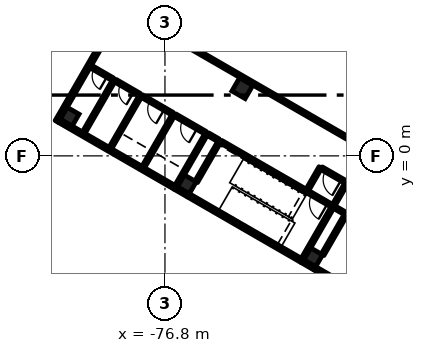
"""IFC4 building model, lengths in metres.
Left out: names, types, materials, properties, quantities, classifications, styles, units other than length and angle.
Written with IfcOpenShell. Run it as: python <this file> out.ifc"""

import sys

from ifc_helpers import new_model, si_unit, direction, frame, frame_2d, origin, origin_2d, place, context, subcontext, project, spatial, rectangle, extrude, element, fill, save


model = new_model("IFC4")
c1 = context("Model", 3, precision=1e-05, world=origin(), true_north=direction((0.0, 1.0)))
c2 = subcontext(c1, "Body", "Model", "MODEL_VIEW")
j1 = project(units=[si_unit("LENGTHUNIT", "METRE"), si_unit("PLANEANGLEUNIT", "RADIAN")], contexts=[c1])
p1 = place(None, origin())
s1 = spatial("IfcSite", under=j1, at=p1, CompositionType="ELEMENT")
p2 = place(p1, origin())
s2 = spatial("IfcBuilding", under=s1, at=p2, CompositionType="ELEMENT")
p3 = place(p2, frame((0.0, 0.0, 6.0)))
s3 = spatial("IfcBuildingStorey", under=s2, at=p3, CompositionType="ELEMENT", Elevation=6.0)
p4 = place(p3, frame((-71.71, 4.451, 0.0), z_axis=(0.0, 0.0, 1.0), x_axis=(-0.5, -0.866025403784, 0.0)))
e1 = element("IfcColumn", 1, at=p4, inside=s3, PredefinedType="COLUMN", context=c2, shape_type="SweptSolid", body=[
    extrude(rectangle(XDim=1.0, YDim=1.0, at=origin_2d()), origin(), (0.0, 0.0, 1.0), 5.4),
])
for number, where, z_axis, x_axis in (
    (2, (-67.046, -6.671, 0.0), (0.0, 0.0, 1.0), (-0.5, -0.866, 0.0)),
    (3, (-75.36, -1.871, 0.0), (0.0, 0.0, 1.0), (-0.5, -0.866, 0.0)),
    (4, (-83.067, 2.579, 0.0), (0.0, 0.0, 1.0), (-0.5, -0.866, 0.0)),
):
    element("IfcColumn", number, at=place(p3, frame(where, z_axis=z_axis, x_axis=x_axis)), inside=s3, PredefinedType="COLUMN", context=c2, shape_type="SweptSolid", body=[
        extrude(rectangle(XDim=0.9, YDim=0.9, at=origin_2d()), origin(), (0.0, 0.0, 1.0), 5.4),
    ])
p5 = place(p3, frame((-83.915, 2.26, 0.0), z_axis=(0.0, 0.0, 1.0), x_axis=(0.500001855621, 0.866024332438, 0.0)))
e5 = element("IfcWall", 5, at=p5, inside=s3, PredefinedType="SOLIDWALL", context=c2, shape_type="SweptSolid", body=[
    extrude(rectangle(XDim=10.312, YDim=0.25, at=frame_2d((5.156, 0.0))), origin(), (0.0, 0.0, 1.0), 5.1),
])
p6 = place(p3, frame((-59.496, -11.694, 0.0), z_axis=(0.0, 0.0, 1.0), x_axis=(-0.866021068297, 0.500007509209, 0.0)))
e6 = element("IfcWall", 6, at=p6, inside=s3, PredefinedType="SOLIDWALL", context=c2, shape_type="SweptSolid", body=[
    extrude(rectangle(XDim=8.6, YDim=0.25, at=frame_2d((4.3, 0.0))), origin(), (0.0, 0.0, 1.0), 5.1),
])
p7 = place(p3, frame((-67.81, -6.894, 0.0), z_axis=(0.0, 0.0, 1.0), x_axis=(-0.866028165386, 0.499995216735, 0.0)))
e7 = element("IfcWall", 7, at=p7, inside=s3, PredefinedType="SOLIDWALL", context=c2, shape_type="SweptSolid", body=[
    extrude(rectangle(XDim=8.6, YDim=0.25, at=frame_2d((4.3, 0.0))), origin(), (0.0, 0.0, 1.0), 5.1),
])
p8 = place(p3, frame((-76.124, -2.094, 0.0), z_axis=(0.0, 0.0, 1.0), x_axis=(-0.866025267465, 0.500000236112, 0.0)))
e8 = element("IfcWall", 8, at=p8, inside=s3, PredefinedType="SOLIDWALL", context=c2, shape_type="SweptSolid", body=[
    extrude(rectangle(XDim=8.8, YDim=0.25, at=frame_2d((4.4, 0.0))), origin(), (0.0, 0.0, 1.0), 5.1),
])
for number, where, z_axis, x_axis in (
    (9, (-66.944, -7.394, 0.0), (0.0, 0.0, 1.0), (-0.866, 0.5, 0.0)),
    (10, (-75.258, -2.594, 0.0), (0.0, 0.0, 1.0), (-0.866, 0.5, 0.0)),
):
    element("IfcWall", number, at=place(p3, frame(where, z_axis=z_axis, x_axis=x_axis)), inside=s3, PredefinedType="SOLIDWALL", context=c2, shape_type="SweptSolid", body=[
        extrude(rectangle(XDim=1.0, YDim=0.25, at=frame_2d((0.5, 0.0))), origin(), (0.0, 0.0, 1.0), 5.1),
    ])
p9 = place(p3, frame((-64.881, -3.821, 0.0), z_axis=(0.0, 0.0, 1.0), x_axis=(-0.49999285859, -0.86602952684, 0.0)))
e11 = element("IfcWall", 11, at=p9, inside=s3, PredefinedType="SOLIDWALL", context=c2, shape_type="SweptSolid", body=[
    extrude(rectangle(XDim=3.1, YDim=0.2, at=frame_2d((1.55, 0.0))), origin(), (0.0, 0.0, 1.0), 5.1),
])
p10 = place(p3, frame((-65.747, -3.321, 0.0), z_axis=(0.0, 0.0, 1.0), x_axis=(-0.49999894854, -0.866026010844, 0.0)))
e12 = element("IfcWall", 12, at=p10, inside=s3, PredefinedType="SOLIDWALL", context=c2, shape_type="SweptSolid", body=[
    extrude(rectangle(XDim=4.0, YDim=0.2, at=frame_2d((2.0, 0.0))), origin(), (0.0, 0.0, 1.0), 5.1),
])
p11 = place(p3, frame((-73.195, 0.979, 0.0), z_axis=(0.0, 0.0, 1.0), x_axis=(-0.500026960575, -0.86600983753, 0.0)))
e13 = element("IfcWall", 13, at=p11, inside=s3, PredefinedType="SOLIDWALL", context=c2, shape_type="SweptSolid", body=[
    extrude(rectangle(XDim=3.1, YDim=0.2, at=frame_2d((1.55, 0.0))), origin(), (0.0, 0.0, 1.0), 5.1),
])
p12 = place(p3, frame((-65.834, -3.271, 0.0), z_axis=(0.0, 0.0, 1.0), x_axis=(-0.866036909293, 0.499980071345, 0.0)))
e14 = element("IfcWall", 14, at=p12, inside=s3, PredefinedType="SOLIDWALL", context=c2, shape_type="SweptSolid", body=[
    extrude(rectangle(XDim=1.75, YDim=0.2, at=frame_2d((0.875, 0.0))), origin(), (0.0, 0.0, 1.0), 5.1),
])
p13 = place(p12, frame((0.3, 0.0, 0.0)))
e15 = element("IfcOpeningElement", 15, at=p13, cuts=e14, PredefinedType="OPENING", context=c2, shape_type="SweptSolid", body=[
    extrude(rectangle(XDim=1.2, YDim=2.1, at=frame_2d((0.6, 1.05))), frame((0.0, 0.11, 0.0), z_axis=(0.0, -1.0, 0.0), x_axis=(1.0, 0.0, 0.0)), (0.0, 0.0, 1.0), 0.22),
])
p14 = place(p3, frame((-67.349, -2.396, 0.0), z_axis=(0.0, 0.0, 1.0), x_axis=(-0.86601134256, 0.500024353964, 0.0)))
e16 = element("IfcWall", 16, at=p14, inside=s3, PredefinedType="SOLIDWALL", context=c2, shape_type="SweptSolid", body=[
    extrude(rectangle(XDim=6.65, YDim=0.2, at=frame_2d((3.325, 0.0))), origin(), (0.0, 0.0, 1.0), 5.1),
])
for number, where, z_axis, x_axis in (
    (17, (-74.061, 1.479, 0.0), (0.0, 0.0, 1.0), (-0.5, -0.866, 0.0)),
    (18, (-76.226, 2.729, 0.0), (0.0, 0.0, 1.0), (-0.5, -0.866, 0.0)),
    (19, (-78.391, 3.979, 0.0), (0.0, 0.0, 1.0), (-0.5, -0.866, 0.0)),
):
    element("IfcWall", number, at=place(p3, frame(where, z_axis=z_axis, x_axis=x_axis)), inside=s3, PredefinedType="SOLIDWALL", context=c2, shape_type="SweptSolid", body=[
        extrude(rectangle(XDim=4.0, YDim=0.2, at=frame_2d((2.0, 0.0))), origin(), (0.0, 0.0, 1.0), 5.1),
    ])
p15 = place(p3, frame((-74.148, 1.529, 0.0), z_axis=(0.0, 0.0, 1.0), x_axis=(-0.865980515519, 0.500077740698, 0.0)))
e20 = element("IfcWall", 20, at=p15, inside=s3, PredefinedType="SOLIDWALL", context=c2, shape_type="SweptSolid", body=[
    extrude(rectangle(XDim=2.3, YDim=0.2, at=frame_2d((1.15, 0.0))), origin(), (0.0, 0.0, 1.0), 5.1),
])
p16 = place(p15, frame((0.6, 0.0, 0.0)))
e21 = element("IfcOpeningElement", 21, at=p16, cuts=e20, PredefinedType="OPENING", context=c2, shape_type="SweptSolid", body=[
    extrude(rectangle(XDim=1.1, YDim=2.1, at=frame_2d((0.55, 1.05))), frame((0.0, 0.11, 0.0), z_axis=(0.0, -1.0, 0.0), x_axis=(1.0, 0.0, 0.0)), (0.0, 0.0, 1.0), 0.22),
])
p17 = place(p3, frame((-76.313, 2.779, 0.0), z_axis=(0.0, 0.0, 1.0), x_axis=(-0.865980515519, 0.500077740698, 0.0)))
e22 = element("IfcWall", 22, at=p17, inside=s3, PredefinedType="SOLIDWALL", context=c2, shape_type="SweptSolid", body=[
    extrude(rectangle(XDim=2.3, YDim=0.2, at=frame_2d((1.15, 0.0))), origin(), (0.0, 0.0, 1.0), 5.1),
])
p18 = place(p17, frame((0.6, 0.0, 0.0)))
e23 = element("IfcOpeningElement", 23, at=p18, cuts=e22, PredefinedType="OPENING", context=c2, shape_type="SweptSolid", body=[
    extrude(rectangle(XDim=1.1, YDim=2.1, at=frame_2d((0.55, 1.05))), frame((0.0, 0.11, 0.0), z_axis=(0.0, -1.0, 0.0), x_axis=(1.0, 0.0, 0.0)), (0.0, 0.0, 1.0), 0.22),
])
for number, where, z_axis, x_axis in (
    (24, (-64.847, -1.763, 0.0), (0.0, 0.0, 1.0), (-0.5, -0.866, 0.0)),
    (25, (-66.579, -0.763, 0.0), (0.0, 0.0, 1.0), (-0.5, -0.866, 0.0)),
):
    element("IfcWall", number, at=place(p3, frame(where, z_axis=z_axis, x_axis=x_axis)), inside=s3, PredefinedType="PARTITIONING", context=c2, shape_type="SweptSolid", body=[
        extrude(rectangle(XDim=1.7, YDim=0.2, at=frame_2d((0.85, 0.0))), origin(), (0.0, 0.0, 1.0), 4.5),
    ])
p19 = place(p3, frame((-64.934, -1.713, 0.0), z_axis=(0.0, 0.0, 1.0), x_axis=(-0.866022985545, 0.500004188491, 0.0)))
e26 = element("IfcWall", 26, at=p19, inside=s3, PredefinedType="PARTITIONING", context=c2, shape_type="SweptSolid", body=[
    extrude(rectangle(XDim=1.8, YDim=0.2, at=frame_2d((0.9, 0.0))), origin(), (0.0, 0.0, 1.0), 4.5),
])
p20 = place(p19, frame((0.3, 0.0, 0.0)))
e27 = element("IfcOpeningElement", 27, at=p20, cuts=e26, PredefinedType="OPENING", context=c2, shape_type="SweptSolid", body=[
    extrude(rectangle(XDim=1.2, YDim=2.1, at=frame_2d((0.6, 1.05))), frame((0.0, 0.11, 0.0), z_axis=(0.0, -1.0, 0.0), x_axis=(1.0, 0.0, 0.0)), (0.0, 0.0, 1.0), 0.22),
])
p21 = place(p3, frame((-80.145, 4.991, 0.0), z_axis=(0.0, 0.0, 1.0), x_axis=(-0.49999894854, -0.866026010844, 0.0)))
e28 = element("IfcWall", 28, at=p21, inside=s3, PredefinedType="PARTITIONING", context=c2, shape_type="SweptSolid", body=[
    extrude(rectangle(XDim=4.0, YDim=0.2, at=frame_2d((2.0, 0.0))), origin(), (0.0, 0.0, 1.0), 4.5),
])
p22 = place(p3, frame((-78.478, 4.029, 0.0), z_axis=(0.0, 0.0, 1.0), x_axis=(-0.865978377894, 0.500081442387, 0.0)))
e29 = element("IfcWall", 29, at=p22, inside=s3, PredefinedType="PARTITIONING", context=c2, shape_type="SweptSolid", body=[
    extrude(rectangle(XDim=1.825, YDim=0.2, at=frame_2d((0.913, 0.0))), origin(), (0.0, 0.0, 1.0), 4.5),
])
p23 = place(p22, frame((0.413, 0.0, 0.0)))
e30 = element("IfcOpeningElement", 30, at=p23, cuts=e29, PredefinedType="OPENING", context=c2, shape_type="SweptSolid", body=[
    extrude(rectangle(XDim=1.0, YDim=2.1, at=frame_2d((0.5, 1.05))), frame((0.0, 0.11, 0.0), z_axis=(0.0, -1.0, 0.0), x_axis=(1.0, 0.0, 0.0)), (0.0, 0.0, 1.0), 0.22),
])
p24 = place(p3, frame((-80.231, 5.041, 0.0), z_axis=(0.0, 0.0, 1.0), x_axis=(-0.865964676353, 0.500105168249, 0.0)))
e31 = element("IfcWall", 31, at=p24, inside=s3, PredefinedType="PARTITIONING", context=c2, shape_type="SweptSolid", body=[
    extrude(rectangle(XDim=1.675, YDim=0.2, at=frame_2d((0.837, 0.0))), origin(), (0.0, 0.0, 1.0), 4.5),
])
p25 = place(p24, frame((0.413, 0.0, 0.0)))
e32 = element("IfcOpeningElement", 32, at=p25, cuts=e31, PredefinedType="OPENING", context=c2, shape_type="SweptSolid", body=[
    extrude(rectangle(XDim=1.0, YDim=2.1, at=frame_2d((0.5, 1.05))), frame((0.0, 0.11, 0.0), z_axis=(0.0, -1.0, 0.0), x_axis=(1.0, 0.0, 0.0)), (0.0, 0.0, 1.0), 0.22),
])
p26 = place(p3, frame((-41.866, -12.058, 0.0), z_axis=(0.0, 0.0, 1.0), x_axis=(-0.866025540551, 0.499999763114, 0.0)))
e33 = element("IfcWall", 33, at=p26, inside=s3, PredefinedType="PARTITIONING", context=c2, shape_type="SweptSolid", body=[
    extrude(rectangle(XDim=39.4, YDim=0.2, at=frame_2d((19.7, 0.0))), origin(), (0.0, 0.0, 1.0), 4.5),
])
p27 = place(p3, frame((-64.968, -3.771, 0.0), z_axis=(0.0, 0.0, 1.0), x_axis=(-0.865885638426, 0.500242002602, 0.0)))
e34 = element("IfcWall", 34, at=p27, inside=s3, PredefinedType="PARTITIONING", context=c2, shape_type="SweptSolid", body=[
    extrude(rectangle(XDim=0.8, YDim=0.2, at=frame_2d((0.4, 0.0))), origin(), (0.0, 0.0, 1.0), 4.5),
])
p28 = place(p3, frame((-73.281, 1.029, 0.0), z_axis=(0.0, 0.0, 1.0), x_axis=(-0.865961984968, 0.500109828528, 0.0)))
e35 = element("IfcWall", 35, at=p28, inside=s3, PredefinedType="PARTITIONING", context=c2, shape_type="SweptSolid", body=[
    extrude(rectangle(XDim=0.8, YDim=0.2, at=frame_2d((0.4, 0.0))), origin(), (0.0, 0.0, 1.0), 4.5),
])
p29 = place(p13, origin())
e36 = element("IfcDoor", 36, at=p29, inside=s3, OperationType="SINGLE_SWING_LEFT", PredefinedType="DOOR", context=c2, shape_type="SweptSolid", body=[
    extrude(rectangle(XDim=1.2, YDim=2.1, at=frame_2d((0.6, 1.05))), frame((0.0, 0.025, 0.0), z_axis=(0.0, -1.0, 0.0), x_axis=(1.0, 0.0, 0.0)), (0.0, 0.0, 1.0), 0.05),
])
fill(e15, e36)
p30 = place(p16, origin())
e37 = element("IfcDoor", 37, at=p30, inside=s3, OperationType="DOUBLE_DOOR_SLIDING", PredefinedType="DOOR", context=c2, shape_type="SweptSolid", body=[
    extrude(rectangle(XDim=1.1, YDim=2.1, at=frame_2d((0.55, 1.05))), frame((0.0, 0.025, 0.0), z_axis=(0.0, -1.0, 0.0), x_axis=(1.0, 0.0, 0.0)), (0.0, 0.0, 1.0), 0.05),
])
fill(e21, e37)
p31 = place(p18, origin())
e38 = element("IfcDoor", 38, at=p31, inside=s3, OperationType="DOUBLE_DOOR_SLIDING", PredefinedType="DOOR", context=c2, shape_type="SweptSolid", body=[
    extrude(rectangle(XDim=1.1, YDim=2.1, at=frame_2d((0.55, 1.05))), frame((0.0, 0.025, 0.0), z_axis=(0.0, -1.0, 0.0), x_axis=(1.0, 0.0, 0.0)), (0.0, 0.0, 1.0), 0.05),
])
fill(e23, e38)
p32 = place(p20, origin())
e39 = element("IfcDoor", 39, at=p32, inside=s3, OperationType="SINGLE_SWING_LEFT", PredefinedType="DOOR", context=c2, shape_type="SweptSolid", body=[
    extrude(rectangle(XDim=1.2, YDim=2.1, at=frame_2d((0.6, 1.05))), frame((0.0, 0.025, 0.0), z_axis=(0.0, -1.0, 0.0), x_axis=(1.0, 0.0, 0.0)), (0.0, 0.0, 1.0), 0.05),
])
fill(e27, e39)
p33 = place(p23, origin())
e40 = element("IfcDoor", 40, at=p33, inside=s3, OperationType="SINGLE_SWING_LEFT", PredefinedType="DOOR", context=c2, shape_type="SweptSolid", body=[
    extrude(rectangle(XDim=1.0, YDim=2.1, at=frame_2d((0.5, 1.05))), frame((0.0, 0.025, 0.0), z_axis=(0.0, -1.0, 0.0), x_axis=(1.0, 0.0, 0.0)), (0.0, 0.0, 1.0), 0.05),
])
fill(e30, e40)
p34 = place(p25, origin())
e41 = element("IfcDoor", 41, at=p34, inside=s3, OperationType="SINGLE_SWING_LEFT", PredefinedType="DOOR", context=c2, shape_type="SweptSolid", body=[
    extrude(rectangle(XDim=1.0, YDim=2.1, at=frame_2d((0.5, 1.05))), frame((0.0, 0.025, 0.0), z_axis=(0.0, -1.0, 0.0), x_axis=(1.0, 0.0, 0.0)), (0.0, 0.0, 1.0), 0.05),
])
fill(e32, e41)
save(model, sys.argv[1])
